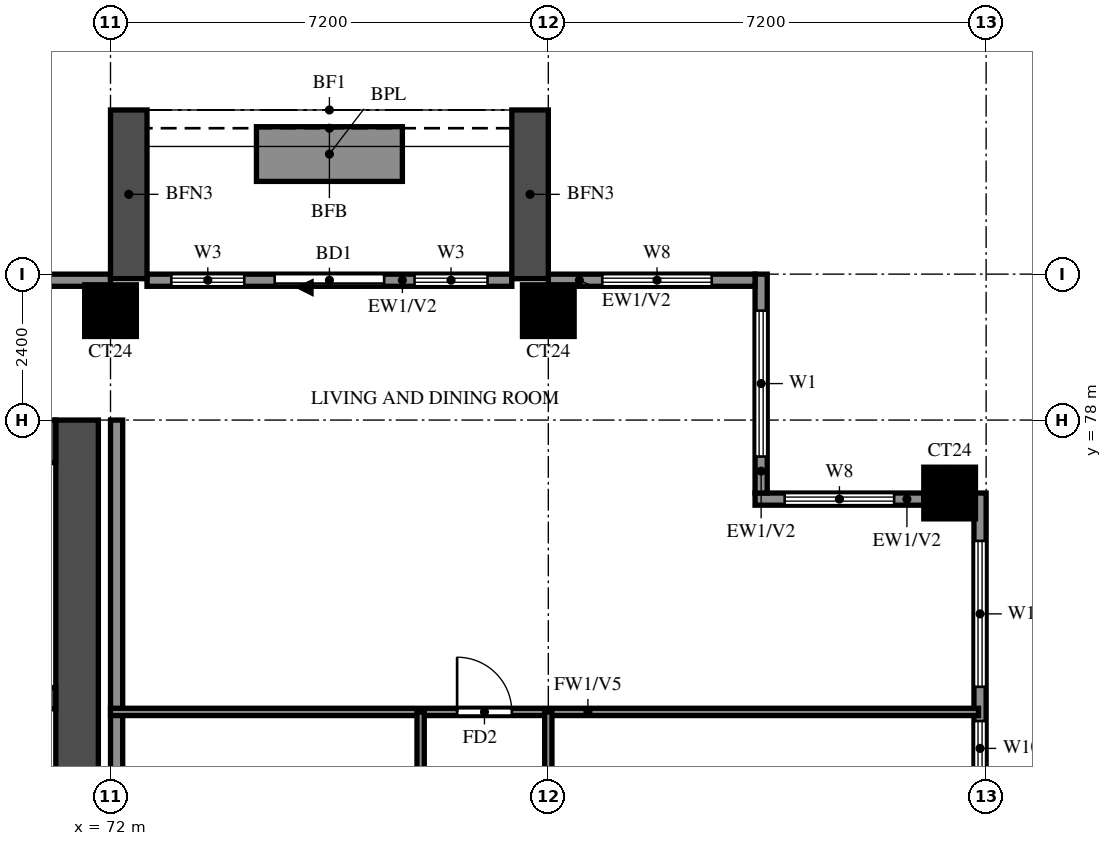
"""IFC4 building model, lengths in metres.
Left out: names, types, materials, properties, quantities, classifications, styles, units other than length and angle.
Written with IfcOpenShell. Run it as: python <this file> out.ifc"""

import sys

from ifc_helpers import new_model, si_unit, direction, frame, frame_2d, origin, origin_2d, place, context, subcontext, project, spatial, rectangle, extrude, source, transform, mapped, element, fill, save


model = new_model("IFC4")
c1 = context("Model", 3, precision=1e-05, world=origin(), true_north=direction((0.0, 1.0)))
c2 = subcontext(c1, "Body", "Model", "MODEL_VIEW")
j1 = project(units=[si_unit("LENGTHUNIT", "METRE"), si_unit("PLANEANGLEUNIT", "RADIAN")], contexts=[c1])
p1 = place(None, origin())
s1 = spatial("IfcSite", under=j1, at=p1, CompositionType="ELEMENT")
p2 = place(p1, origin())
s2 = spatial("IfcBuilding", under=s1, at=p2, CompositionType="ELEMENT")
p3 = place(p2, frame((0.0, 0.0, 160.5)))
s3 = spatial("IfcBuildingStorey", under=s2, at=p3, CompositionType="ELEMENT", Elevation=160.5)
m1 = source(origin(), c2, "Body", "SweptSolid", [
    extrude(rectangle(XDim=0.85, YDim=0.85, at=origin_2d()), origin(), (0.0, 0.0, 1.0), 3.2),
])
for number, where, z_axis, x_axis in (
    (1, (85.8, 76.8, 0.0), (0.0, 0.0, 1.0), (1.0, 0.0, 0.0)),
    (2, (72.0, 79.8, 0.0), (0.0, 0.0, 1.0), (1.0, 0.0, 0.0)),
    (3, (79.2, 79.8, 0.0), (0.0, 0.0, 1.0), (1.0, 0.0, 0.0)),
):
    element("IfcColumn", number, at=place(p3, frame(where, z_axis=z_axis, x_axis=x_axis)), inside=s3, PredefinedType="COLUMN", context=c2, shape_type="MappedRepresentation", body=[
        mapped(m1, transform((0.0, 0.0, 0.0))),
    ])
p4 = place(p3, frame((71.45, 66.1, 0.0), z_axis=(0.0, 0.0, 1.0), x_axis=(0.0, 1.0, 0.0)))
e4 = element("IfcWall", 4, at=p4, inside=s3, PredefinedType="SHEAR", context=c2, shape_type="SweptSolid", body=[
    extrude(rectangle(XDim=11.9, YDim=0.7, at=frame_2d((5.95, 0.0))), origin(), (0.0, 0.0, 1.0), 3.2),
])
p5 = place(p3, frame((29.7, 77.65, 0.0), z_axis=(0.0, 0.0, 1.0), x_axis=(1.0, 0.0, 0.0)))
e5 = element("IfcWall", 5, at=p5, inside=s3, PredefinedType="SHEAR", context=c2, shape_type="SweptSolid", body=[
    extrude(rectangle(XDim=41.4, YDim=0.7, at=frame_2d((20.7, 0.0))), origin(), (0.0, 0.0, 1.0), 3.2),
])
p6 = place(p3, frame((67.975, 73.425, 0.0), z_axis=(0.0, 0.0, 1.0), x_axis=(1.0, 0.0, 0.0)))
e6 = element("IfcWall", 6, at=p6, inside=s3, PredefinedType="SHEAR", context=c2, shape_type="SweptSolid", body=[
    extrude(rectangle(XDim=3.125, YDim=0.35, at=frame_2d((1.562, 0.0))), origin(), (0.0, 0.0, 1.0), 3.2),
])
p7 = place(p3, frame((86.3, 48.2, 0.0), z_axis=(0.0, 0.0, 1.0), x_axis=(0.0, 1.0, 0.0)))
e7 = element("IfcWall", 7, at=p7, inside=s3, PredefinedType="SOLIDWALL", context=c2, shape_type="SweptSolid", body=[
    extrude(rectangle(XDim=28.6, YDim=0.2, at=frame_2d((14.3, 0.0))), origin(), (0.0, 0.0, 1.0), 3.2),
])
p8 = place(p7, frame((4.3, 0.0, 0.0)))
e8 = element("IfcOpeningElement", 8, at=p8, cuts=e7, PredefinedType="OPENING", context=c2, shape_type="SweptSolid", body=[
    extrude(rectangle(XDim=1.8, YDim=2.4, at=frame_2d((0.9, 1.2))), frame((0.0, 0.11, 0.0), z_axis=(0.0, -1.0, 0.0), x_axis=(1.0, 0.0, 0.0)), (0.0, 0.0, 1.0), 0.22),
])
p9 = place(p7, frame((18.7, 0.0, 0.0)))
e9 = element("IfcOpeningElement", 9, at=p9, cuts=e7, PredefinedType="OPENING", context=c2, shape_type="SweptSolid", body=[
    extrude(rectangle(XDim=1.8, YDim=2.4, at=frame_2d((0.9, 1.2))), frame((0.0, 0.11, 0.0), z_axis=(0.0, -1.0, 0.0), x_axis=(1.0, 0.0, 0.0)), (0.0, 0.0, 1.0), 0.22),
])
p10 = place(p7, frame((0.6, 0.0, 0.6)))
e10 = element("IfcOpeningElement", 10, at=p10, cuts=e7, PredefinedType="OPENING", context=c2, shape_type="SweptSolid", body=[
    extrude(rectangle(XDim=1.2, YDim=2.4, at=frame_2d((0.6, 1.2))), frame((0.0, 0.11, 0.0), z_axis=(0.0, -1.0, 0.0), x_axis=(1.0, 0.0, 0.0)), (0.0, 0.0, 1.0), 0.22),
])
p11 = place(p7, frame((7.488, 0.0, 0.6)))
e11 = element("IfcOpeningElement", 11, at=p11, cuts=e7, PredefinedType="OPENING", context=c2, shape_type="SweptSolid", body=[
    extrude(rectangle(XDim=1.2, YDim=2.4, at=frame_2d((0.6, 1.2))), frame((0.0, 0.11, 0.0), z_axis=(0.0, -1.0, 0.0), x_axis=(1.0, 0.0, 0.0)), (0.0, 0.0, 1.0), 0.22),
])
p12 = place(p7, frame((10.413, 0.0, 0.6)))
e12 = element("IfcOpeningElement", 12, at=p12, cuts=e7, PredefinedType="OPENING", context=c2, shape_type="SweptSolid", body=[
    extrude(rectangle(XDim=2.4, YDim=2.4, at=frame_2d((1.2, 1.2))), frame((0.0, 0.11, 0.0), z_axis=(0.0, -1.0, 0.0), x_axis=(1.0, 0.0, 0.0)), (0.0, 0.0, 1.0), 0.22),
])
p13 = place(p7, frame((14.688, 0.0, 0.6)))
e13 = element("IfcOpeningElement", 13, at=p13, cuts=e7, PredefinedType="OPENING", context=c2, shape_type="SweptSolid", body=[
    extrude(rectangle(XDim=1.8, YDim=2.4, at=frame_2d((0.9, 1.2))), frame((0.0, 0.11, 0.0), z_axis=(0.0, -1.0, 0.0), x_axis=(1.0, 0.0, 0.0)), (0.0, 0.0, 1.0), 0.22),
])
p14 = place(p7, frame((21.887, 0.0, 0.6)))
e14 = element("IfcOpeningElement", 14, at=p14, cuts=e7, PredefinedType="OPENING", context=c2, shape_type="SweptSolid", body=[
    extrude(rectangle(XDim=1.2, YDim=2.4, at=frame_2d((0.6, 1.2))), frame((0.0, 0.11, 0.0), z_axis=(0.0, -1.0, 0.0), x_axis=(1.0, 0.0, 0.0)), (0.0, 0.0, 1.0), 0.22),
])
p15 = place(p7, frame((23.95, 0.0, 0.6)))
e15 = element("IfcOpeningElement", 15, at=p15, cuts=e7, PredefinedType="OPENING", context=c2, shape_type="SweptSolid", body=[
    extrude(rectangle(XDim=0.9, YDim=2.4, at=frame_2d((0.45, 1.2))), frame((0.0, 0.11, 0.0), z_axis=(0.0, -1.0, 0.0), x_axis=(1.0, 0.0, 0.0)), (0.0, 0.0, 1.0), 0.22),
])
p16 = place(p7, frame((25.413, 0.0, 0.6)))
e16 = element("IfcOpeningElement", 16, at=p16, cuts=e7, PredefinedType="OPENING", context=c2, shape_type="SweptSolid", body=[
    extrude(rectangle(XDim=2.4, YDim=2.4, at=frame_2d((1.2, 1.2))), frame((0.0, 0.11, 0.0), z_axis=(0.0, -1.0, 0.0), x_axis=(1.0, 0.0, 0.0)), (0.0, 0.0, 1.0), 0.22),
])
p17 = place(p3, frame((85.375, 76.7, 0.0), z_axis=(0.0, 0.0, 1.0), x_axis=(-1.0, 0.0, 0.0)))
e17 = element("IfcWall", 17, at=p17, inside=s3, PredefinedType="SOLIDWALL", context=c2, shape_type="SweptSolid", body=[
    extrude(rectangle(XDim=2.775, YDim=0.2, at=frame_2d((1.387, 0.0))), origin(), (0.0, 0.0, 1.0), 3.2),
])
p18 = place(p17, frame((0.488, 0.0, 0.6)))
e18 = element("IfcOpeningElement", 18, at=p18, cuts=e17, PredefinedType="OPENING", context=c2, shape_type="SweptSolid", body=[
    extrude(rectangle(XDim=1.8, YDim=2.4, at=frame_2d((0.9, 1.2))), frame((0.0, 0.11, 0.0), z_axis=(0.0, -1.0, 0.0), x_axis=(1.0, 0.0, 0.0)), (0.0, 0.0, 1.0), 0.22),
])
p19 = place(p3, frame((82.7, 76.8, 0.0), z_axis=(0.0, 0.0, 1.0), x_axis=(0.0, 1.0, 0.0)))
e19 = element("IfcWall", 19, at=p19, inside=s3, PredefinedType="SOLIDWALL", context=c2, shape_type="SweptSolid", body=[
    extrude(rectangle(XDim=3.6, YDim=0.2, at=frame_2d((1.8, 0.0))), origin(), (0.0, 0.0, 1.0), 3.2),
])
p20 = place(p19, frame((0.6, 0.0, 0.6)))
e20 = element("IfcOpeningElement", 20, at=p20, cuts=e19, PredefinedType="OPENING", context=c2, shape_type="SweptSolid", body=[
    extrude(rectangle(XDim=2.4, YDim=2.4, at=frame_2d((1.2, 1.2))), frame((0.0, 0.11, 0.0), z_axis=(0.0, -1.0, 0.0), x_axis=(1.0, 0.0, 0.0)), (0.0, 0.0, 1.0), 0.22),
])
p21 = place(p3, frame((82.6, 80.3, 0.0), z_axis=(0.0, 0.0, 1.0), x_axis=(-1.0, 0.0, 0.0)))
e21 = element("IfcWall", 21, at=p21, inside=s3, PredefinedType="SOLIDWALL", context=c2, shape_type="SweptSolid", body=[
    extrude(rectangle(XDim=3.4, YDim=0.2, at=frame_2d((1.7, 0.0))), origin(), (0.0, 0.0, 1.0), 3.2),
])
p22 = place(p21, frame((0.712, 0.0, 0.6)))
e22 = element("IfcOpeningElement", 22, at=p22, cuts=e21, PredefinedType="OPENING", context=c2, shape_type="SweptSolid", body=[
    extrude(rectangle(XDim=1.8, YDim=2.4, at=frame_2d((0.9, 1.2))), frame((0.0, 0.11, 0.0), z_axis=(0.0, -1.0, 0.0), x_axis=(1.0, 0.0, 0.0)), (0.0, 0.0, 1.0), 0.22),
])
p23 = place(p3, frame((78.6, 80.3, 0.0), z_axis=(0.0, 0.0, 1.0), x_axis=(-1.0, 0.0, 0.0)))
e23 = element("IfcWall", 23, at=p23, inside=s3, PredefinedType="SOLIDWALL", context=c2, shape_type="SweptSolid", body=[
    extrude(rectangle(XDim=6.0, YDim=0.2, at=frame_2d((3.0, 0.0))), origin(), (0.0, 0.0, 1.0), 3.2),
])
p24 = place(p23, frame((2.1, 0.0, 0.0)))
e24 = element("IfcOpeningElement", 24, at=p24, cuts=e23, PredefinedType="OPENING", context=c2, shape_type="SweptSolid", body=[
    extrude(rectangle(XDim=1.8, YDim=2.4, at=frame_2d((0.9, 1.2))), frame((0.0, 0.11, 0.0), z_axis=(0.0, -1.0, 0.0), x_axis=(1.0, 0.0, 0.0)), (0.0, 0.0, 1.0), 0.22),
])
p25 = place(p23, frame((0.4, 0.0, 0.6)))
e25 = element("IfcOpeningElement", 25, at=p25, cuts=e23, PredefinedType="OPENING", context=c2, shape_type="SweptSolid", body=[
    extrude(rectangle(XDim=1.2, YDim=2.4, at=frame_2d((0.6, 1.2))), frame((0.0, 0.11, 0.0), z_axis=(0.0, -1.0, 0.0), x_axis=(1.0, 0.0, 0.0)), (0.0, 0.0, 1.0), 0.22),
])
p26 = place(p23, frame((4.4, 0.0, 0.6)))
e26 = element("IfcOpeningElement", 26, at=p26, cuts=e23, PredefinedType="OPENING", context=c2, shape_type="SweptSolid", body=[
    extrude(rectangle(XDim=1.2, YDim=2.4, at=frame_2d((0.6, 1.2))), frame((0.0, 0.11, 0.0), z_axis=(0.0, -1.0, 0.0), x_axis=(1.0, 0.0, 0.0)), (0.0, 0.0, 1.0), 0.22),
])
p27 = place(p3, frame((72.0, 80.3, 0.0), z_axis=(0.0, 0.0, 1.0), x_axis=(-1.0, 0.0, 0.0)))
e27 = element("IfcWall", 27, at=p27, inside=s3, PredefinedType="SOLIDWALL", context=c2, shape_type="SweptSolid", body=[
    extrude(rectangle(XDim=54.0, YDim=0.2, at=frame_2d((27.0, 0.0))), origin(), (0.0, 0.0, 1.0), 3.2),
])
p28 = place(p27, frame((44.158, 0.0, 0.6)))
e28 = element("IfcOpeningElement", 28, at=p28, cuts=e27, PredefinedType="OPENING", context=c2, shape_type="SweptSolid", body=[
    extrude(rectangle(XDim=2.4, YDim=2.4, at=frame_2d((1.2, 1.2))), frame((0.0, 0.11, 0.0), z_axis=(0.0, -1.0, 0.0), x_axis=(1.0, 0.0, 0.0)), (0.0, 0.0, 1.0), 0.22),
])
p29 = place(p27, frame((47.042, 0.0, 0.6)))
e29 = element("IfcOpeningElement", 29, at=p29, cuts=e27, PredefinedType="OPENING", context=c2, shape_type="SweptSolid", body=[
    extrude(rectangle(XDim=2.4, YDim=2.4, at=frame_2d((1.2, 1.2))), frame((0.0, 0.11, 0.0), z_axis=(0.0, -1.0, 0.0), x_axis=(1.0, 0.0, 0.0)), (0.0, 0.0, 1.0), 0.22),
])
p30 = place(p27, frame((51.387, 0.0, 0.6)))
e30 = element("IfcOpeningElement", 30, at=p30, cuts=e27, PredefinedType="OPENING", context=c2, shape_type="SweptSolid", body=[
    extrude(rectangle(XDim=1.8, YDim=2.4, at=frame_2d((0.9, 1.2))), frame((0.0, 0.11, 0.0), z_axis=(0.0, -1.0, 0.0), x_axis=(1.0, 0.0, 0.0)), (0.0, 0.0, 1.0), 0.22),
])
for number, where, z_axis, x_axis in (
    (31, (78.9, 80.325, 0.0), (0.0, 0.0, 1.0), (0.0, 1.0, 0.0)),
    (32, (72.3, 80.325, 0.0), (0.0, 0.0, 1.0), (0.0, 1.0, 0.0)),
):
    element("IfcWall", number, at=place(p3, frame(where, z_axis=z_axis, x_axis=x_axis)), inside=s3, PredefinedType="SOLIDWALL", context=c2, shape_type="SweptSolid", body=[
        extrude(rectangle(XDim=2.775, YDim=0.6, at=frame_2d((1.388, 0.0))), origin(), (0.0, 0.0, 1.0), 2.85),
    ])
p31 = place(p3, frame((76.8, 82.375, 0.0), z_axis=(0.0, 0.0, 1.0), x_axis=(-1.0, 0.0, 0.0)))
e33 = element("IfcWall", 33, at=p31, inside=s3, PredefinedType="SOLIDWALL", context=c2, shape_type="SweptSolid", body=[
    extrude(rectangle(XDim=2.4, YDim=0.9, at=frame_2d((1.2, 0.0))), origin(), (0.0, 0.0, 1.0), 0.9),
])
p32 = place(p3, frame((72.1, 62.4, 0.0), z_axis=(0.0, 0.0, 1.0), x_axis=(0.0, 1.0, 0.0)))
e34 = element("IfcWall", 34, at=p32, inside=s3, PredefinedType="SOLIDWALL", context=c2, shape_type="SweptSolid", body=[
    extrude(rectangle(XDim=15.6, YDim=0.2, at=frame_2d((7.8, 0.0))), origin(), (0.0, 0.0, 1.0), 3.2),
])
p33 = place(p3, frame((72.0, 73.2, 0.0), z_axis=(0.0, 0.0, 1.0), x_axis=(1.0, 0.0, 0.0)))
e35 = element("IfcWall", 35, at=p33, inside=s3, PredefinedType="PARTITIONING", context=c2, shape_type="SweptSolid", body=[
    extrude(rectangle(XDim=14.275, YDim=0.12, at=frame_2d((7.137, 0.0))), origin(), (0.0, 0.0, 1.0), 2.3),
])
p34 = place(p33, frame((5.7, 0.0, 0.0)))
e36 = element("IfcOpeningElement", 36, at=p34, cuts=e35, PredefinedType="OPENING", context=c2, shape_type="SweptSolid", body=[
    extrude(rectangle(XDim=0.9, YDim=2.1, at=frame_2d((0.45, 1.05))), frame((0.0, 0.07, 0.0), z_axis=(0.0, -1.0, 0.0), x_axis=(1.0, 0.0, 0.0)), (0.0, 0.0, 1.0), 0.14),
])
p35 = place(p3, frame((77.1, 64.8, 0.0), z_axis=(0.0, 0.0, 1.0), x_axis=(0.0, 1.0, 0.0)))
e37 = element("IfcWall", 37, at=p35, inside=s3, PredefinedType="PARTITIONING", context=c2, shape_type="SweptSolid", body=[
    extrude(rectangle(XDim=8.4, YDim=0.12, at=frame_2d((4.2, 0.0))), origin(), (0.0, 0.0, 1.0), 3.2),
])
p36 = place(p35, frame((6.125, 0.0, 0.0)))
e38 = element("IfcOpeningElement", 38, at=p36, cuts=e37, PredefinedType="OPENING", context=c2, shape_type="SweptSolid", body=[
    extrude(rectangle(XDim=0.8, YDim=2.1, at=frame_2d((0.4, 1.05))), frame((0.0, 0.07, 0.0), z_axis=(0.0, -1.0, 0.0), x_axis=(1.0, 0.0, 0.0)), (0.0, 0.0, 1.0), 0.14),
])
p37 = place(p3, frame((79.2, 48.125, 0.0), z_axis=(0.0, 0.0, 1.0), x_axis=(0.0, 1.0, 0.0)))
e39 = element("IfcWall", 39, at=p37, inside=s3, PredefinedType="PARTITIONING", context=c2, shape_type="SweptSolid", body=[
    extrude(rectangle(XDim=25.075, YDim=0.12, at=frame_2d((12.538, 0.0))), origin(), (0.0, 0.0, 1.0), 3.2),
])
p38 = place(p37, frame((1.288, 0.0, 0.0)))
e40 = element("IfcOpeningElement", 40, at=p38, cuts=e39, PredefinedType="OPENING", context=c2, shape_type="SweptSolid", body=[
    extrude(rectangle(XDim=0.9, YDim=2.1, at=frame_2d((0.45, 1.05))), frame((0.0, 0.07, 0.0), z_axis=(0.0, -1.0, 0.0), x_axis=(1.0, 0.0, 0.0)), (0.0, 0.0, 1.0), 0.14),
])
p39 = place(p37, frame((4.825, 0.0, 0.0)))
e41 = element("IfcOpeningElement", 41, at=p39, cuts=e39, PredefinedType="OPENING", context=c2, shape_type="SweptSolid", body=[
    extrude(rectangle(XDim=0.9, YDim=2.1, at=frame_2d((0.45, 1.05))), frame((0.0, 0.07, 0.0), z_axis=(0.0, -1.0, 0.0), x_axis=(1.0, 0.0, 0.0)), (0.0, 0.0, 1.0), 0.14),
])
p40 = place(p37, frame((9.925, 0.0, 0.0)))
e42 = element("IfcOpeningElement", 42, at=p40, cuts=e39, PredefinedType="OPENING", context=c2, shape_type="SweptSolid", body=[
    extrude(rectangle(XDim=1.5, YDim=2.1, at=frame_2d((0.75, 1.05))), frame((0.0, 0.07, 0.0), z_axis=(0.0, -1.0, 0.0), x_axis=(1.0, 0.0, 0.0)), (0.0, 0.0, 1.0), 0.14),
])
p41 = place(p37, frame((15.625, 0.0, 0.0)))
e43 = element("IfcOpeningElement", 43, at=p41, cuts=e39, PredefinedType="OPENING", context=c2, shape_type="SweptSolid", body=[
    extrude(rectangle(XDim=0.9, YDim=2.1, at=frame_2d((0.45, 1.05))), frame((0.0, 0.07, 0.0), z_axis=(0.0, -1.0, 0.0), x_axis=(1.0, 0.0, 0.0)), (0.0, 0.0, 1.0), 0.14),
])
p42 = place(p37, frame((19.225, 0.0, 0.0)))
e44 = element("IfcOpeningElement", 44, at=p42, cuts=e39, PredefinedType="OPENING", context=c2, shape_type="SweptSolid", body=[
    extrude(rectangle(XDim=0.9, YDim=2.1, at=frame_2d((0.45, 1.05))), frame((0.0, 0.07, 0.0), z_axis=(0.0, -1.0, 0.0), x_axis=(1.0, 0.0, 0.0)), (0.0, 0.0, 1.0), 0.14),
])
p43 = place(p37, frame((22.825, 0.0, 0.0)))
e45 = element("IfcOpeningElement", 45, at=p43, cuts=e39, PredefinedType="OPENING", context=c2, shape_type="SweptSolid", body=[
    extrude(rectangle(XDim=0.9, YDim=2.1, at=frame_2d((0.45, 1.05))), frame((0.0, 0.07, 0.0), z_axis=(0.0, -1.0, 0.0), x_axis=(1.0, 0.0, 0.0)), (0.0, 0.0, 1.0), 0.14),
])
p44 = place(p15, origin())
e46 = element("IfcWindow", 46, at=p44, inside=s3, PartitioningType="SINGLE_PANEL", PredefinedType="WINDOW", context=c2, shape_type="SweptSolid", body=[
    extrude(rectangle(XDim=0.9, YDim=2.4, at=frame_2d((0.45, 1.2))), frame((0.0, 0.03, 0.0), z_axis=(0.0, -1.0, 0.0), x_axis=(1.0, 0.0, 0.0)), (0.0, 0.0, 1.0), 0.06),
])
fill(e15, e46)
p45 = place(p16, origin())
e47 = element("IfcWindow", 47, at=p45, inside=s3, PartitioningType="DOUBLE_PANEL_VERTICAL", PredefinedType="WINDOW", context=c2, shape_type="SweptSolid", body=[
    extrude(rectangle(XDim=2.4, YDim=2.4, at=frame_2d((1.2, 1.2))), frame((0.0, 0.03, 0.0), z_axis=(0.0, -1.0, 0.0), x_axis=(1.0, 0.0, 0.0)), (0.0, 0.0, 1.0), 0.06),
])
fill(e16, e47)
p46 = place(p18, origin())
e48 = element("IfcWindow", 48, at=p46, inside=s3, PartitioningType="DOUBLE_PANEL_VERTICAL", PredefinedType="WINDOW", context=c2, shape_type="SweptSolid", body=[
    extrude(rectangle(XDim=1.8, YDim=2.4, at=frame_2d((0.9, 1.2))), frame((0.0, 0.03, 0.0), z_axis=(0.0, -1.0, 0.0), x_axis=(1.0, 0.0, 0.0)), (0.0, 0.0, 1.0), 0.06),
])
fill(e18, e48)
p47 = place(p20, origin())
e49 = element("IfcWindow", 49, at=p47, inside=s3, PartitioningType="DOUBLE_PANEL_VERTICAL", PredefinedType="WINDOW", context=c2, shape_type="SweptSolid", body=[
    extrude(rectangle(XDim=2.4, YDim=2.4, at=frame_2d((1.2, 1.2))), frame((0.0, 0.03, 0.0), z_axis=(0.0, -1.0, 0.0), x_axis=(1.0, 0.0, 0.0)), (0.0, 0.0, 1.0), 0.06),
])
fill(e20, e49)
p48 = place(p22, origin())
e50 = element("IfcWindow", 50, at=p48, inside=s3, PartitioningType="DOUBLE_PANEL_VERTICAL", PredefinedType="WINDOW", context=c2, shape_type="SweptSolid", body=[
    extrude(rectangle(XDim=1.8, YDim=2.4, at=frame_2d((0.9, 1.2))), frame((0.0, 0.03, 0.0), z_axis=(0.0, -1.0, 0.0), x_axis=(1.0, 0.0, 0.0)), (0.0, 0.0, 1.0), 0.06),
])
fill(e22, e50)
p49 = place(p24, origin())
e51 = element("IfcDoor", 51, at=p49, inside=s3, OperationType="DOUBLE_DOOR_SLIDING", PredefinedType="DOOR", context=c2, shape_type="SweptSolid", body=[
    extrude(rectangle(XDim=1.8, YDim=2.4, at=frame_2d((0.9, 1.2))), frame((0.0, 0.025, 0.0), z_axis=(0.0, -1.0, 0.0), x_axis=(1.0, 0.0, 0.0)), (0.0, 0.0, 1.0), 0.05),
])
fill(e24, e51)
p50 = place(p25, origin())
e52 = element("IfcWindow", 52, at=p50, inside=s3, PartitioningType="SINGLE_PANEL", PredefinedType="WINDOW", context=c2, shape_type="SweptSolid", body=[
    extrude(rectangle(XDim=1.2, YDim=2.4, at=frame_2d((0.6, 1.2))), frame((0.0, 0.03, 0.0), z_axis=(0.0, -1.0, 0.0), x_axis=(1.0, 0.0, 0.0)), (0.0, 0.0, 1.0), 0.06),
])
fill(e25, e52)
p51 = place(p26, origin())
e53 = element("IfcWindow", 53, at=p51, inside=s3, PartitioningType="SINGLE_PANEL", PredefinedType="WINDOW", context=c2, shape_type="SweptSolid", body=[
    extrude(rectangle(XDim=1.2, YDim=2.4, at=frame_2d((0.6, 1.2))), frame((0.0, 0.03, 0.0), z_axis=(0.0, -1.0, 0.0), x_axis=(1.0, 0.0, 0.0)), (0.0, 0.0, 1.0), 0.06),
])
fill(e26, e53)
p52 = place(p34, origin())
e54 = element("IfcDoor", 54, at=p52, inside=s3, OperationType="SINGLE_SWING_LEFT", PredefinedType="DOOR", context=c2, shape_type="SweptSolid", body=[
    extrude(rectangle(XDim=0.9, YDim=2.1, at=frame_2d((0.45, 1.05))), frame((0.0, 0.025, 0.0), z_axis=(0.0, -1.0, 0.0), x_axis=(1.0, 0.0, 0.0)), (0.0, 0.0, 1.0), 0.05),
])
fill(e36, e54)
save(model, sys.argv[1])
